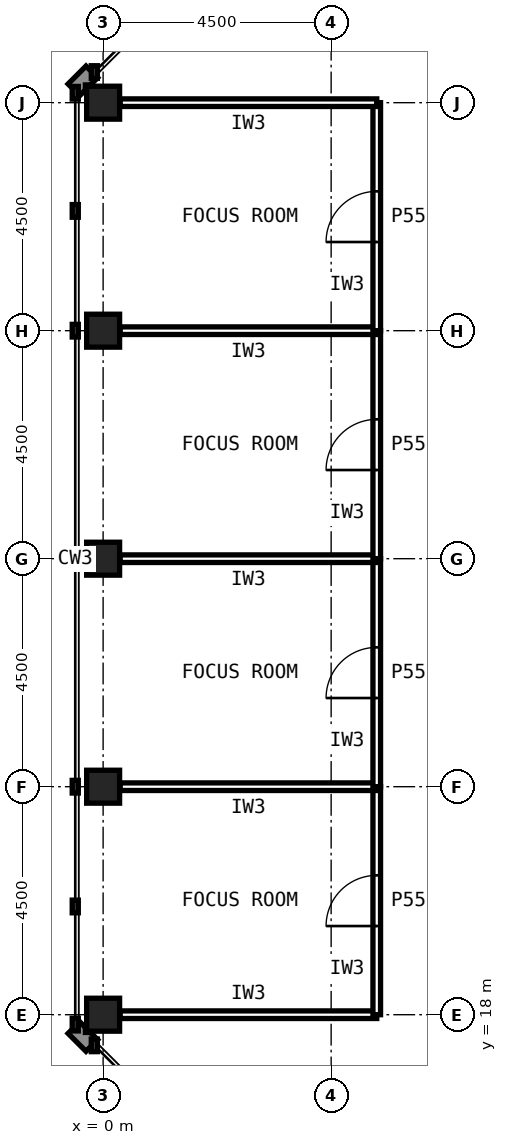
"""IFC4 building model, lengths in metres.
Left out: names, types, materials, properties, quantities, classifications, styles, units other than length and angle.
Written with IfcOpenShell. Run it as: python <this file> out.ifc"""

import sys

from ifc_helpers import new_model, si_unit, direction, frame, frame_2d, origin, origin_2d, place, context, subcontext, project, spatial, rectangle, hollow_rectangle, extrude, element, fill, save


model = new_model("IFC4")
c1 = context("Model", 3, precision=1e-05, world=origin(), true_north=direction((0.0, 1.0)))
c2 = subcontext(c1, "Body", "Model", "MODEL_VIEW")
j1 = project(units=[si_unit("LENGTHUNIT", "METRE"), si_unit("PLANEANGLEUNIT", "RADIAN")], contexts=[c1])
p1 = place(None, origin())
s1 = spatial("IfcSite", under=j1, at=p1, CompositionType="ELEMENT")
p2 = place(p1, origin())
s2 = spatial("IfcBuilding", under=s1, at=p2, CompositionType="ELEMENT")
p3 = place(p2, frame((0.0, 0.0, 230.6)))
s3 = spatial("IfcBuildingStorey", under=s2, at=p3, CompositionType="ELEMENT", Elevation=230.6)
for number, where, z_axis, x_axis in (
    (1, (0.0, 36.0, 0.0), (0.0, 0.0, 1.0), (1.0, 0.0, 0.0)),
    (2, (0.0, 31.5, 0.0), (0.0, 0.0, 1.0), (1.0, 0.0, 0.0)),
    (3, (0.0, 27.0, 0.0), (0.0, 0.0, 1.0), (1.0, 0.0, 0.0)),
    (4, (0.0, 22.5, 0.0), (0.0, 0.0, 1.0), (1.0, 0.0, 0.0)),
    (5, (0.0, 18.0, 0.0), (0.0, 0.0, 1.0), (1.0, 0.0, 0.0)),
):
    element("IfcColumn", number, at=place(p3, frame(where, z_axis=z_axis, x_axis=x_axis)), inside=s3, PredefinedType="COLUMN", context=c2, shape_type="SweptSolid", body=[
        extrude(hollow_rectangle(XDim=0.65, YDim=0.65, WallThickness=0.032, at=origin_2d()), origin(), (0.0, 0.0, 1.0), 4.0),
    ])
p4 = place(p3, frame((0.335, 18.0, 0.0), z_axis=(0.0, 0.0, 1.0), x_axis=(1.0, 0.0, 0.0)))
e6 = element("IfcWall", 6, at=p4, inside=s3, PredefinedType="PARTITIONING", context=c2, shape_type="SweptSolid", body=[
    extrude(rectangle(XDim=5.065, YDim=0.15, at=frame_2d((2.532, 0.0))), origin(), (0.0, 0.0, 1.0), 2.989),
])
p5 = place(p3, frame((5.4, 18.0, 0.0), z_axis=(0.0, 0.0, 1.0), x_axis=(0.0, 1.0, 0.0)))
e7 = element("IfcWall", 7, at=p5, inside=s3, PredefinedType="PARTITIONING", context=c2, shape_type="SweptSolid", body=[
    extrude(rectangle(XDim=4.5, YDim=0.15, at=frame_2d((2.25, 0.0))), origin(), (0.0, 0.0, 1.0), 3.84),
])
p6 = place(p5, frame((1.75, 0.0, 0.0)))
e8 = element("IfcOpeningElement", 8, at=p6, cuts=e7, PredefinedType="OPENING", context=c2, shape_type="SweptSolid", body=[
    extrude(rectangle(XDim=1.0, YDim=2.1, at=frame_2d((0.5, 1.05))), frame((0.0, 0.085, 0.0), z_axis=(0.0, -1.0, 0.0), x_axis=(1.0, 0.0, 0.0)), (0.0, 0.0, 1.0), 0.17),
])
p7 = place(p3, frame((5.4, 22.5, 0.0), z_axis=(0.0, 0.0, 1.0), x_axis=(-1.0, 0.0, 0.0)))
e9 = element("IfcWall", 9, at=p7, inside=s3, PredefinedType="PARTITIONING", context=c2, shape_type="SweptSolid", body=[
    extrude(rectangle(XDim=5.065, YDim=0.15, at=frame_2d((2.532, 0.0))), origin(), (0.0, 0.0, 1.0), 2.989),
])
p8 = place(p3, frame((5.4, 22.5, 0.0), z_axis=(0.0, 0.0, 1.0), x_axis=(0.0, 1.0, 0.0)))
e10 = element("IfcWall", 10, at=p8, inside=s3, PredefinedType="PARTITIONING", context=c2, shape_type="SweptSolid", body=[
    extrude(rectangle(XDim=4.5, YDim=0.15, at=frame_2d((2.25, 0.0))), origin(), (0.0, 0.0, 1.0), 3.84),
])
p9 = place(p8, frame((1.75, 0.0, 0.0)))
e11 = element("IfcOpeningElement", 11, at=p9, cuts=e10, PredefinedType="OPENING", context=c2, shape_type="SweptSolid", body=[
    extrude(rectangle(XDim=1.0, YDim=2.1, at=frame_2d((0.5, 1.05))), frame((0.0, 0.085, 0.0), z_axis=(0.0, -1.0, 0.0), x_axis=(1.0, 0.0, 0.0)), (0.0, 0.0, 1.0), 0.17),
])
p10 = place(p3, frame((5.4, 27.0, 0.0), z_axis=(0.0, 0.0, 1.0), x_axis=(-1.0, 0.0, 0.0)))
e12 = element("IfcWall", 12, at=p10, inside=s3, PredefinedType="PARTITIONING", context=c2, shape_type="SweptSolid", body=[
    extrude(rectangle(XDim=5.065, YDim=0.15, at=frame_2d((2.532, 0.0))), origin(), (0.0, 0.0, 1.0), 2.989),
])
p11 = place(p3, frame((5.4, 27.0, 0.0), z_axis=(0.0, 0.0, 1.0), x_axis=(0.0, 1.0, 0.0)))
e13 = element("IfcWall", 13, at=p11, inside=s3, PredefinedType="PARTITIONING", context=c2, shape_type="SweptSolid", body=[
    extrude(rectangle(XDim=4.5, YDim=0.15, at=frame_2d((2.25, 0.0))), origin(), (0.0, 0.0, 1.0), 3.84),
])
p12 = place(p11, frame((1.75, 0.0, 0.0)))
e14 = element("IfcOpeningElement", 14, at=p12, cuts=e13, PredefinedType="OPENING", context=c2, shape_type="SweptSolid", body=[
    extrude(rectangle(XDim=1.0, YDim=2.1, at=frame_2d((0.5, 1.05))), frame((0.0, 0.085, 0.0), z_axis=(0.0, -1.0, 0.0), x_axis=(1.0, 0.0, 0.0)), (0.0, 0.0, 1.0), 0.17),
])
p13 = place(p3, frame((5.4, 31.5, 0.0), z_axis=(0.0, 0.0, 1.0), x_axis=(-1.0, 0.0, 0.0)))
e15 = element("IfcWall", 15, at=p13, inside=s3, PredefinedType="PARTITIONING", context=c2, shape_type="SweptSolid", body=[
    extrude(rectangle(XDim=5.065, YDim=0.15, at=frame_2d((2.532, 0.0))), origin(), (0.0, 0.0, 1.0), 2.989),
])
p14 = place(p3, frame((5.4, 31.5, 0.0), z_axis=(0.0, 0.0, 1.0), x_axis=(0.0, 1.0, 0.0)))
e16 = element("IfcWall", 16, at=p14, inside=s3, PredefinedType="PARTITIONING", context=c2, shape_type="SweptSolid", body=[
    extrude(rectangle(XDim=4.5, YDim=0.15, at=frame_2d((2.25, 0.0))), origin(), (0.0, 0.0, 1.0), 3.84),
])
p15 = place(p14, frame((1.75, 0.0, 0.0)))
e17 = element("IfcOpeningElement", 17, at=p15, cuts=e16, PredefinedType="OPENING", context=c2, shape_type="SweptSolid", body=[
    extrude(rectangle(XDim=1.0, YDim=2.1, at=frame_2d((0.5, 1.05))), frame((0.0, 0.085, 0.0), z_axis=(0.0, -1.0, 0.0), x_axis=(1.0, 0.0, 0.0)), (0.0, 0.0, 1.0), 0.17),
])
p16 = place(p3, frame((5.4, 36.0, 0.0), z_axis=(0.0, 0.0, 1.0), x_axis=(-1.0, 0.0, 0.0)))
e18 = element("IfcWall", 18, at=p16, inside=s3, PredefinedType="PARTITIONING", context=c2, shape_type="SweptSolid", body=[
    extrude(rectangle(XDim=5.065, YDim=0.15, at=frame_2d((2.532, 0.0))), origin(), (0.0, 0.0, 1.0), 2.989),
])
p17 = place(p6, origin())
e19 = element("IfcDoor", 19, at=p17, inside=s3, OperationType="SINGLE_SWING_LEFT", PredefinedType="DOOR", context=c2, shape_type="SweptSolid", body=[
    extrude(rectangle(XDim=1.0, YDim=2.1, at=frame_2d((0.5, 1.05))), frame((0.0, 0.025, 0.0), z_axis=(0.0, -1.0, 0.0), x_axis=(1.0, 0.0, 0.0)), (0.0, 0.0, 1.0), 0.05),
])
fill(e8, e19)
p18 = place(p9, origin())
e20 = element("IfcDoor", 20, at=p18, inside=s3, OperationType="SINGLE_SWING_LEFT", PredefinedType="DOOR", context=c2, shape_type="SweptSolid", body=[
    extrude(rectangle(XDim=1.0, YDim=2.1, at=frame_2d((0.5, 1.05))), frame((0.0, 0.025, 0.0), z_axis=(0.0, -1.0, 0.0), x_axis=(1.0, 0.0, 0.0)), (0.0, 0.0, 1.0), 0.05),
])
fill(e11, e20)
p19 = place(p12, origin())
e21 = element("IfcDoor", 21, at=p19, inside=s3, OperationType="SINGLE_SWING_LEFT", PredefinedType="DOOR", context=c2, shape_type="SweptSolid", body=[
    extrude(rectangle(XDim=1.0, YDim=2.1, at=frame_2d((0.5, 1.05))), frame((0.0, 0.025, 0.0), z_axis=(0.0, -1.0, 0.0), x_axis=(1.0, 0.0, 0.0)), (0.0, 0.0, 1.0), 0.05),
])
fill(e14, e21)
p20 = place(p15, origin())
e22 = element("IfcDoor", 22, at=p20, inside=s3, OperationType="SINGLE_SWING_LEFT", PredefinedType="DOOR", context=c2, shape_type="SweptSolid", body=[
    extrude(rectangle(XDim=1.0, YDim=2.1, at=frame_2d((0.5, 1.05))), frame((0.0, 0.025, 0.0), z_axis=(0.0, -1.0, 0.0), x_axis=(1.0, 0.0, 0.0)), (0.0, 0.0, 1.0), 0.05),
])
fill(e17, e22)
save(model, sys.argv[1])
